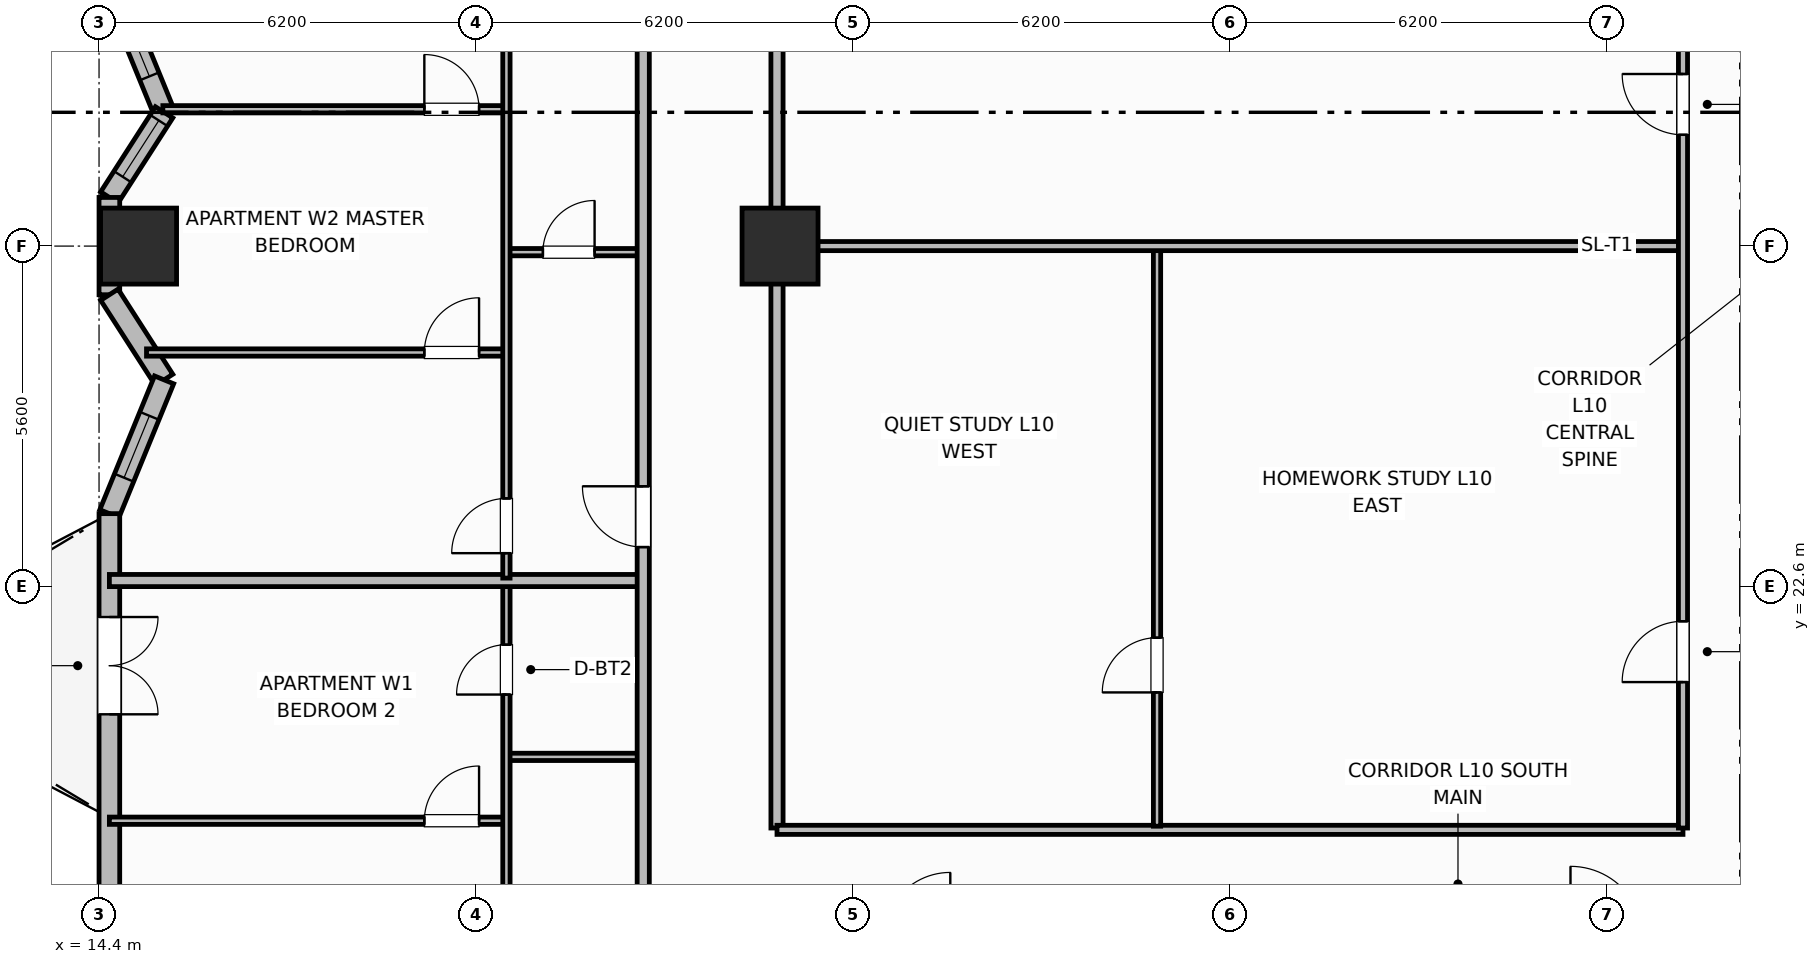
"""IFC4 building model, lengths in metres.
Left out: names, types, materials, properties, quantities, classifications, styles, units other than length and angle.
Written with IfcOpenShell. Run it as: python <this file> out.ifc"""

import sys

from ifc_helpers import new_model, si_unit, direction, frame, frame_2d, origin, origin_2d, place, context, subcontext, project, spatial, rectangle, extrude, element, fill, save


model = new_model("IFC4")
c1 = context("Model", 3, precision=1e-05, world=origin(), true_north=direction((0.0, 1.0)))
c2 = subcontext(c1, "Body", "Model", "MODEL_VIEW")
j1 = project(units=[si_unit("LENGTHUNIT", "METRE"), si_unit("PLANEANGLEUNIT", "RADIAN")], contexts=[c1])
p1 = place(None, origin())
s1 = spatial("IfcSite", under=j1, at=p1, CompositionType="ELEMENT")
p2 = place(p1, origin())
s2 = spatial("IfcBuilding", under=s1, at=p2, CompositionType="ELEMENT")
p3 = place(p2, frame((0.0, 0.0, 43.6)))
s3 = spatial("IfcBuildingStorey", under=s2, at=p3, CompositionType="ELEMENT", Elevation=43.6)
for number, where, z_axis, x_axis in (
    (1, (25.6, 28.2, 0.0), (0.0, 0.0, 1.0), (1.0, 0.0, 0.0)),
    (2, (15.05, 28.2, 0.0), (0.0, 0.0, 1.0), (1.0, 0.0, 0.0)),
):
    element("IfcColumn", number, at=place(p3, frame(where, z_axis=z_axis, x_axis=x_axis)), inside=s3, PredefinedType="COLUMN", context=c2, shape_type="SweptSolid", body=[
        extrude(rectangle(XDim=1.25, YDim=1.25, at=origin_2d()), origin(), (0.0, 0.0, 1.0), 3.7),
    ])
p4 = place(p3, frame((14.57, 32.6, 0.0), z_axis=(0.0, 0.0, 1.0), x_axis=(0.378568858991, -0.925573130013, 0.0)))
e3 = element("IfcWall", 3, at=p4, inside=s3, PredefinedType="SOLIDWALL", context=c2, shape_type="SweptSolid", body=[
    extrude(rectangle(XDim=2.377, YDim=0.34, at=frame_2d((1.188, 0.0))), origin(), (0.0, 0.0, 1.0), 2.7),
])
p5 = place(p4, frame((0.638, 0.0, 0.89)))
e4 = element("IfcOpeningElement", 4, at=p5, cuts=e3, PredefinedType="OPENING", context=c2, shape_type="SweptSolid", body=[
    extrude(rectangle(XDim=1.1, YDim=1.65, at=frame_2d((0.55, 0.825))), frame((0.0, 0.18, 0.0), z_axis=(0.0, -1.0, 0.0), x_axis=(1.0, 0.0, 0.0)), (0.0, 0.0, 1.0), 0.36),
])
p6 = place(p3, frame((15.47, 30.4, 0.0), z_axis=(0.0, 0.0, 1.0), x_axis=(-0.540742762169, -0.841188008214, 0.0)))
e5 = element("IfcWall", 5, at=p6, inside=s3, PredefinedType="SOLIDWALL", context=c2, shape_type="SweptSolid", body=[
    extrude(rectangle(XDim=1.664, YDim=0.34, at=frame_2d((0.832, 0.0))), origin(), (0.0, 0.0, 1.0), 2.7),
])
p7 = place(p6, frame((0.16, 0.0, 0.89)))
e6 = element("IfcOpeningElement", 6, at=p7, cuts=e5, PredefinedType="OPENING", context=c2, shape_type="SweptSolid", body=[
    extrude(rectangle(XDim=1.1, YDim=1.65, at=frame_2d((0.55, 0.825))), frame((0.0, 0.18, 0.0), z_axis=(0.0, -1.0, 0.0), x_axis=(1.0, 0.0, 0.0)), (0.0, 0.0, 1.0), 0.36),
])
p8 = place(p3, frame((14.57, 29.0, 0.0), z_axis=(0.0, 0.0, 1.0), x_axis=(0.0, -1.0, 0.0)))
e7 = element("IfcWall", 7, at=p8, inside=s3, PredefinedType="SOLIDWALL", context=c2, shape_type="SweptSolid", body=[
    extrude(rectangle(XDim=1.6, YDim=0.34, at=frame_2d((0.8, 0.0))), origin(), (0.0, 0.0, 1.0), 2.7),
])
p9 = place(p3, frame((14.57, 27.4, 0.0), z_axis=(0.0, 0.0, 1.0), x_axis=(0.540742762169, -0.841188008214, 0.0)))
e8 = element("IfcWall", 8, at=p9, inside=s3, PredefinedType="SOLIDWALL", context=c2, shape_type="SweptSolid", body=[
    extrude(rectangle(XDim=1.664, YDim=0.34, at=frame_2d((0.832, 0.0))), origin(), (0.0, 0.0, 1.0), 2.7),
])
p10 = place(p3, frame((15.47, 26.0, 0.0), z_axis=(0.0, 0.0, 1.0), x_axis=(-0.378604849088, -0.925558408879, 0.0)))
e9 = element("IfcWall", 9, at=p10, inside=s3, PredefinedType="SOLIDWALL", context=c2, shape_type="SweptSolid", body=[
    extrude(rectangle(XDim=2.377, YDim=0.34, at=frame_2d((1.188, 0.0))), origin(), (0.0, 0.0, 1.0), 2.7),
])
p11 = place(p10, frame((0.638, 0.0, 0.89)))
e10 = element("IfcOpeningElement", 10, at=p11, cuts=e9, PredefinedType="OPENING", context=c2, shape_type="SweptSolid", body=[
    extrude(rectangle(XDim=1.1, YDim=1.65, at=frame_2d((0.55, 0.825))), frame((0.0, 0.18, 0.0), z_axis=(0.0, -1.0, 0.0), x_axis=(1.0, 0.0, 0.0)), (0.0, 0.0, 1.0), 0.36),
])
p12 = place(p3, frame((14.57, 23.8, 0.0), z_axis=(0.0, 0.0, 1.0), x_axis=(0.0, -1.0, 0.0)))
e11 = element("IfcWall", 11, at=p12, inside=s3, PredefinedType="SOLIDWALL", context=c2, shape_type="SweptSolid", body=[
    extrude(rectangle(XDim=14.8, YDim=0.34, at=frame_2d((7.4, 0.0))), origin(), (0.0, 0.0, 1.0), 2.7),
])
p13 = place(p12, frame((1.7, 0.0, 0.0)))
e12 = element("IfcOpeningElement", 12, at=p13, cuts=e11, PredefinedType="OPENING", context=c2, shape_type="SweptSolid", body=[
    extrude(rectangle(XDim=1.6, YDim=2.1, at=frame_2d((0.8, 1.05))), frame((0.0, 0.18, 0.0), z_axis=(0.0, -1.0, 0.0), x_axis=(1.0, 0.0, 0.0)), (0.0, 0.0, 1.0), 0.36),
])
p14 = place(p12, frame((7.68, 0.0, 0.89)))
e13 = element("IfcOpeningElement", 13, at=p14, cuts=e11, PredefinedType="OPENING", context=c2, shape_type="SweptSolid", body=[
    extrude(rectangle(XDim=1.1, YDim=1.65, at=frame_2d((0.55, 0.825))), frame((0.0, 0.18, 0.0), z_axis=(0.0, -1.0, 0.0), x_axis=(1.0, 0.0, 0.0)), (0.0, 0.0, 1.0), 0.36),
])
p15 = place(p12, frame((9.95, 0.0, 0.73)))
e14 = element("IfcOpeningElement", 14, at=p15, cuts=e11, PredefinedType="OPENING", context=c2, shape_type="SweptSolid", body=[
    extrude(rectangle(XDim=1.8, YDim=1.85, at=frame_2d((0.9, 0.925))), frame((0.0, 0.18, 0.0), z_axis=(0.0, -1.0, 0.0), x_axis=(1.0, 0.0, 0.0)), (0.0, 0.0, 1.0), 0.36),
])
p16 = place(p3, frame((25.55, 18.63, 0.0), z_axis=(0.0, 0.0, 1.0), x_axis=(0.0, 1.0, 0.0)))
e15 = element("IfcWall", 15, at=p16, inside=s3, PredefinedType="PARTITIONING", context=c2, shape_type="SweptSolid", body=[
    extrude(rectangle(XDim=19.14, YDim=0.2, at=frame_2d((9.57, 0.0))), origin(), (0.0, 0.0, 1.0), 2.53),
])
p17 = place(p3, frame((25.55, 18.6, 0.0), z_axis=(0.0, 0.0, 1.0), x_axis=(1.0, 0.0, 0.0)))
e16 = element("IfcWall", 16, at=p17, inside=s3, PredefinedType="PARTITIONING", context=c2, shape_type="SweptSolid", body=[
    extrude(rectangle(XDim=14.9, YDim=0.15, at=frame_2d((7.45, 0.0))), origin(), (0.0, 0.0, 1.0), 2.53),
])
p18 = place(p3, frame((31.8, 18.66, 0.0), z_axis=(0.0, 0.0, 1.0), x_axis=(0.0, 1.0, 0.0)))
e17 = element("IfcWall", 17, at=p18, inside=s3, PredefinedType="PARTITIONING", context=c2, shape_type="SweptSolid", body=[
    extrude(rectangle(XDim=9.49, YDim=0.12, at=frame_2d((4.745, 0.0))), origin(), (0.0, 0.0, 1.0), 2.53),
])
p19 = place(p18, frame((2.2, 0.0, 0.0)))
e18 = element("IfcOpeningElement", 18, at=p19, cuts=e17, PredefinedType="OPENING", context=c2, shape_type="SweptSolid", body=[
    extrude(rectangle(XDim=0.9, YDim=2.1, at=frame_2d((0.45, 1.05))), frame((0.0, 0.07, 0.0), z_axis=(0.0, -1.0, 0.0), x_axis=(1.0, 0.0, 0.0)), (0.0, 0.0, 1.0), 0.14),
])
p20 = place(p3, frame((25.6, 28.2, 0.0), z_axis=(0.0, 0.0, 1.0), x_axis=(1.0, 0.0, 0.0)))
e19 = element("IfcWall", 19, at=p20, inside=s3, PredefinedType="PARTITIONING", context=c2, shape_type="SweptSolid", body=[
    extrude(rectangle(XDim=14.87, YDim=0.15, at=frame_2d((7.435, 0.0))), origin(), (0.0, 0.0, 1.0), 2.53),
])
p21 = place(p3, frame((40.45, 18.63, 0.0), z_axis=(0.0, 0.0, 1.0), x_axis=(0.0, 1.0, 0.0)))
e20 = element("IfcWall", 20, at=p21, inside=s3, PredefinedType="PARTITIONING", context=c2, shape_type="SweptSolid", body=[
    extrude(rectangle(XDim=19.14, YDim=0.15, at=frame_2d((9.57, 0.0))), origin(), (0.0, 0.0, 1.0), 2.53),
])
p22 = place(p21, frame((2.4, 0.0, 0.0)))
e21 = element("IfcOpeningElement", 21, at=p22, cuts=e20, PredefinedType="OPENING", context=c2, shape_type="SweptSolid", body=[
    extrude(rectangle(XDim=1.0, YDim=2.15, at=frame_2d((0.5, 1.075))), frame((0.0, 0.085, 0.0), z_axis=(0.0, -1.0, 0.0), x_axis=(1.0, 0.0, 0.0)), (0.0, 0.0, 1.0), 0.17),
])
p23 = place(p21, frame((11.4, 0.0, 0.0)))
e22 = element("IfcOpeningElement", 22, at=p23, cuts=e20, PredefinedType="OPENING", context=c2, shape_type="SweptSolid", body=[
    extrude(rectangle(XDim=1.0, YDim=2.15, at=frame_2d((0.5, 1.075))), frame((0.0, 0.085, 0.0), z_axis=(0.0, -1.0, 0.0), x_axis=(1.0, 0.0, 0.0)), (0.0, 0.0, 1.0), 0.17),
])
p24 = place(p3, frame((21.1, 19.8, 0.0), z_axis=(0.0, 0.0, 1.0), x_axis=(1.0, 0.0, 0.0)))
e23 = element("IfcWall", 23, at=p24, inside=s3, PredefinedType="PARTITIONING", context=c2, shape_type="SweptSolid", body=[
    extrude(rectangle(XDim=2.25, YDim=0.12, at=frame_2d((1.125, 0.0))), origin(), (0.0, 0.0, 1.0), 2.53),
])
p25 = place(p3, frame((14.57, 18.75, 0.0), z_axis=(0.0, 0.0, 1.0), x_axis=(1.0, 0.0, 0.0)))
e24 = element("IfcWall", 24, at=p25, inside=s3, PredefinedType="PARTITIONING", context=c2, shape_type="SweptSolid", body=[
    extrude(rectangle(XDim=6.53, YDim=0.12, at=frame_2d((3.265, 0.0))), origin(), (0.0, 0.0, 1.0), 2.53),
])
p26 = place(p25, frame((5.18, 0.0, 0.0)))
e25 = element("IfcOpeningElement", 25, at=p26, cuts=e24, PredefinedType="OPENING", context=c2, shape_type="SweptSolid", body=[
    extrude(rectangle(XDim=0.9, YDim=2.1, at=frame_2d((0.45, 1.05))), frame((0.0, 0.07, 0.0), z_axis=(0.0, -1.0, 0.0), x_axis=(1.0, 0.0, 0.0)), (0.0, 0.0, 1.0), 0.14),
])
p27 = place(p3, frame((21.1, 10.64, 0.0), z_axis=(0.0, 0.0, 1.0), x_axis=(0.0, 1.0, 0.0)))
e26 = element("IfcWall", 26, at=p27, inside=s3, PredefinedType="PARTITIONING", context=c2, shape_type="SweptSolid", body=[
    extrude(rectangle(XDim=12.02, YDim=0.12, at=frame_2d((6.01, 0.0))), origin(), (0.0, 0.0, 1.0), 2.53),
])
p28 = place(p27, frame((0.41, 0.0, 0.0)))
e27 = element("IfcOpeningElement", 27, at=p28, cuts=e26, PredefinedType="OPENING", context=c2, shape_type="SweptSolid", body=[
    extrude(rectangle(XDim=0.9, YDim=2.1, at=frame_2d((0.45, 1.05))), frame((0.0, 0.07, 0.0), z_axis=(0.0, -1.0, 0.0), x_axis=(1.0, 0.0, 0.0)), (0.0, 0.0, 1.0), 0.14),
])
p29 = place(p27, frame((10.185, 0.0, 0.0)))
e28 = element("IfcOpeningElement", 28, at=p29, cuts=e26, PredefinedType="OPENING", context=c2, shape_type="SweptSolid", body=[
    extrude(rectangle(XDim=0.82, YDim=2.08, at=frame_2d((0.41, 1.04))), frame((0.0, 0.07, 0.0), z_axis=(0.0, -1.0, 0.0), x_axis=(1.0, 0.0, 0.0)), (0.0, 0.0, 1.0), 0.14),
])
p30 = place(p3, frame((14.57, 22.7, 0.0), z_axis=(0.0, 0.0, 1.0), x_axis=(1.0, 0.0, 0.0)))
e29 = element("IfcWall", 29, at=p30, inside=s3, PredefinedType="PARTITIONING", context=c2, shape_type="SweptSolid", body=[
    extrude(rectangle(XDim=8.78, YDim=0.2, at=frame_2d((4.39, 0.0))), origin(), (0.0, 0.0, 1.0), 2.53),
])
p31 = place(p3, frame((21.1, 28.1, 0.0), z_axis=(0.0, 0.0, 1.0), x_axis=(1.0, 0.0, 0.0)))
e30 = element("IfcWall", 30, at=p31, inside=s3, PredefinedType="PARTITIONING", context=c2, shape_type="SweptSolid", body=[
    extrude(rectangle(XDim=2.25, YDim=0.12, at=frame_2d((1.125, 0.0))), origin(), (0.0, 0.0, 1.0), 2.53),
])
p32 = place(p31, frame((0.6, 0.0, 0.0)))
e31 = element("IfcOpeningElement", 31, at=p32, cuts=e30, PredefinedType="OPENING", context=c2, shape_type="SweptSolid", body=[
    extrude(rectangle(XDim=0.85, YDim=2.1, at=frame_2d((0.425, 1.05))), frame((0.0, 0.07, 0.0), z_axis=(0.0, -1.0, 0.0), x_axis=(1.0, 0.0, 0.0)), (0.0, 0.0, 1.0), 0.14),
])
p33 = place(p3, frame((15.181, 26.45, 0.0), z_axis=(0.0, 0.0, 1.0), x_axis=(1.0, 0.0, 0.0)))
e32 = element("IfcWall", 32, at=p33, inside=s3, PredefinedType="PARTITIONING", context=c2, shape_type="SweptSolid", body=[
    extrude(rectangle(XDim=5.919, YDim=0.12, at=frame_2d((2.96, 0.0))), origin(), (0.0, 0.0, 1.0), 2.53),
])
p34 = place(p33, frame((4.569, 0.0, 0.0)))
e33 = element("IfcOpeningElement", 33, at=p34, cuts=e32, PredefinedType="OPENING", context=c2, shape_type="SweptSolid", body=[
    extrude(rectangle(XDim=0.9, YDim=2.1, at=frame_2d((0.45, 1.05))), frame((0.0, 0.07, 0.0), z_axis=(0.0, -1.0, 0.0), x_axis=(1.0, 0.0, 0.0)), (0.0, 0.0, 1.0), 0.14),
])
p35 = place(p3, frame((15.449, 30.45, 0.0), z_axis=(0.0, 0.0, 1.0), x_axis=(1.0, 0.0, 0.0)))
e34 = element("IfcWall", 34, at=p35, inside=s3, PredefinedType="PARTITIONING", context=c2, shape_type="SweptSolid", body=[
    extrude(rectangle(XDim=5.651, YDim=0.12, at=frame_2d((2.825, 0.0))), origin(), (0.0, 0.0, 1.0), 2.53),
])
p36 = place(p35, frame((4.301, 0.0, 0.0)))
e35 = element("IfcOpeningElement", 35, at=p36, cuts=e34, PredefinedType="OPENING", context=c2, shape_type="SweptSolid", body=[
    extrude(rectangle(XDim=0.9, YDim=2.1, at=frame_2d((0.45, 1.05))), frame((0.0, 0.07, 0.0), z_axis=(0.0, -1.0, 0.0), x_axis=(1.0, 0.0, 0.0)), (0.0, 0.0, 1.0), 0.14),
])
p37 = place(p3, frame((21.1, 22.74, 0.0), z_axis=(0.0, 0.0, 1.0), x_axis=(0.0, 1.0, 0.0)))
e36 = element("IfcWall", 36, at=p37, inside=s3, PredefinedType="PARTITIONING", context=c2, shape_type="SweptSolid", body=[
    extrude(rectangle(XDim=11.404, YDim=0.12, at=frame_2d((5.702, 0.0))), origin(), (0.0, 0.0, 1.0), 2.53),
])
p38 = place(p37, frame((0.41, 0.0, 0.0)))
e37 = element("IfcOpeningElement", 37, at=p38, cuts=e36, PredefinedType="OPENING", context=c2, shape_type="SweptSolid", body=[
    extrude(rectangle(XDim=0.9, YDim=2.1, at=frame_2d((0.45, 1.05))), frame((0.0, 0.07, 0.0), z_axis=(0.0, -1.0, 0.0), x_axis=(1.0, 0.0, 0.0)), (0.0, 0.0, 1.0), 0.14),
])
p39 = place(p3, frame((23.35, 10.6, 0.0), z_axis=(0.0, 0.0, 1.0), x_axis=(0.0, 1.0, 0.0)))
e38 = element("IfcWall", 38, at=p39, inside=s3, PredefinedType="PARTITIONING", context=c2, shape_type="SweptSolid", body=[
    extrude(rectangle(XDim=35.2, YDim=0.2, at=frame_2d((17.6, 0.0))), origin(), (0.0, 0.0, 1.0), 2.53),
])
p40 = place(p39, frame((2.65, 0.0, 0.0)))
e39 = element("IfcOpeningElement", 39, at=p40, cuts=e38, PredefinedType="OPENING", context=c2, shape_type="SweptSolid", body=[
    extrude(rectangle(XDim=1.0, YDim=2.15, at=frame_2d((0.5, 1.075))), frame((0.0, 0.11, 0.0), z_axis=(0.0, -1.0, 0.0), x_axis=(1.0, 0.0, 0.0)), (0.0, 0.0, 1.0), 0.22),
])
p41 = place(p39, frame((12.65, 0.0, 0.0)))
e40 = element("IfcOpeningElement", 40, at=p41, cuts=e38, PredefinedType="OPENING", context=c2, shape_type="SweptSolid", body=[
    extrude(rectangle(XDim=1.0, YDim=2.15, at=frame_2d((0.5, 1.075))), frame((0.0, 0.11, 0.0), z_axis=(0.0, -1.0, 0.0), x_axis=(1.0, 0.0, 0.0)), (0.0, 0.0, 1.0), 0.22),
])
p42 = place(p39, frame((24.134, 0.0, 0.0)))
e41 = element("IfcOpeningElement", 41, at=p42, cuts=e38, PredefinedType="OPENING", context=c2, shape_type="SweptSolid", body=[
    extrude(rectangle(XDim=1.0, YDim=2.15, at=frame_2d((0.5, 1.075))), frame((0.0, 0.11, 0.0), z_axis=(0.0, -1.0, 0.0), x_axis=(1.0, 0.0, 0.0)), (0.0, 0.0, 1.0), 0.22),
])
p43 = place(p5, origin())
e42 = element("IfcWindow", 42, at=p43, inside=s3, PartitioningType="SINGLE_PANEL", PredefinedType="WINDOW", context=c2, shape_type="SweptSolid", body=[
    extrude(rectangle(XDim=1.1, YDim=1.65, at=frame_2d((0.55, 0.825))), frame((0.0, 0.03, 0.0), z_axis=(0.0, -1.0, 0.0), x_axis=(1.0, 0.0, 0.0)), (0.0, 0.0, 1.0), 0.06),
])
fill(e4, e42)
p44 = place(p7, origin())
e43 = element("IfcWindow", 43, at=p44, inside=s3, PartitioningType="SINGLE_PANEL", PredefinedType="WINDOW", context=c2, shape_type="SweptSolid", body=[
    extrude(rectangle(XDim=1.1, YDim=1.65, at=frame_2d((0.55, 0.825))), frame((0.0, 0.03, 0.0), z_axis=(0.0, -1.0, 0.0), x_axis=(1.0, 0.0, 0.0)), (0.0, 0.0, 1.0), 0.06),
])
fill(e6, e43)
p45 = place(p11, origin())
e44 = element("IfcWindow", 44, at=p45, inside=s3, PartitioningType="SINGLE_PANEL", PredefinedType="WINDOW", context=c2, shape_type="SweptSolid", body=[
    extrude(rectangle(XDim=1.1, YDim=1.65, at=frame_2d((0.55, 0.825))), frame((0.0, 0.03, 0.0), z_axis=(0.0, -1.0, 0.0), x_axis=(1.0, 0.0, 0.0)), (0.0, 0.0, 1.0), 0.06),
])
fill(e10, e44)
p46 = place(p13, origin())
e45 = element("IfcDoor", 45, at=p46, inside=s3, OperationType="DOUBLE_DOOR_SINGLE_SWING", PredefinedType="DOOR", context=c2, shape_type="SweptSolid", body=[
    extrude(rectangle(XDim=1.6, YDim=2.1, at=frame_2d((0.8, 1.05))), frame((0.0, 0.025, 0.0), z_axis=(0.0, -1.0, 0.0), x_axis=(1.0, 0.0, 0.0)), (0.0, 0.0, 1.0), 0.05),
])
fill(e12, e45)
p47 = place(p19, origin())
e46 = element("IfcDoor", 46, at=p47, inside=s3, OperationType="SINGLE_SWING_LEFT", PredefinedType="DOOR", context=c2, shape_type="SweptSolid", body=[
    extrude(rectangle(XDim=0.9, YDim=2.1, at=frame_2d((0.45, 1.05))), frame((0.0, 0.025, 0.0), z_axis=(0.0, -1.0, 0.0), x_axis=(1.0, 0.0, 0.0)), (0.0, 0.0, 1.0), 0.05),
])
fill(e18, e46)
p48 = place(p22, origin())
e47 = element("IfcDoor", 47, at=p48, inside=s3, OperationType="SINGLE_SWING_LEFT", PredefinedType="DOOR", context=c2, shape_type="SweptSolid", body=[
    extrude(rectangle(XDim=1.0, YDim=2.15, at=frame_2d((0.5, 1.075))), frame((0.0, 0.025, 0.0), z_axis=(0.0, -1.0, 0.0), x_axis=(1.0, 0.0, 0.0)), (0.0, 0.0, 1.0), 0.05),
])
fill(e21, e47)
p49 = place(p23, origin())
e48 = element("IfcDoor", 48, at=p49, inside=s3, OperationType="SINGLE_SWING_RIGHT", PredefinedType="DOOR", context=c2, shape_type="SweptSolid", body=[
    extrude(rectangle(XDim=1.0, YDim=2.15, at=frame_2d((0.5, 1.075))), frame((0.0, 0.025, 0.0), z_axis=(0.0, -1.0, 0.0), x_axis=(1.0, 0.0, 0.0)), (0.0, 0.0, 1.0), 0.05),
])
fill(e22, e48)
p50 = place(p26, origin())
e49 = element("IfcDoor", 49, at=p50, inside=s3, OperationType="SINGLE_SWING_RIGHT", PredefinedType="DOOR", context=c2, shape_type="SweptSolid", body=[
    extrude(rectangle(XDim=0.9, YDim=2.1, at=frame_2d((0.45, 1.05))), frame((0.0, 0.025, 0.0), z_axis=(0.0, -1.0, 0.0), x_axis=(1.0, 0.0, 0.0)), (0.0, 0.0, 1.0), 0.05),
])
fill(e25, e49)
p51 = place(p29, origin())
e50 = element("IfcDoor", 50, at=p51, inside=s3, OperationType="SINGLE_SWING_LEFT", PredefinedType="DOOR", context=c2, shape_type="SweptSolid", body=[
    extrude(rectangle(XDim=0.82, YDim=2.08, at=frame_2d((0.41, 1.04))), frame((0.0, 0.025, 0.0), z_axis=(0.0, -1.0, 0.0), x_axis=(1.0, 0.0, 0.0)), (0.0, 0.0, 1.0), 0.05),
])
fill(e28, e50)
p52 = place(p32, origin())
e51 = element("IfcDoor", 51, at=p52, inside=s3, OperationType="SINGLE_SWING_RIGHT", PredefinedType="DOOR", context=c2, shape_type="SweptSolid", body=[
    extrude(rectangle(XDim=0.85, YDim=2.1, at=frame_2d((0.425, 1.05))), frame((0.0, 0.025, 0.0), z_axis=(0.0, -1.0, 0.0), x_axis=(1.0, 0.0, 0.0)), (0.0, 0.0, 1.0), 0.05),
])
fill(e31, e51)
p53 = place(p34, origin())
e52 = element("IfcDoor", 52, at=p53, inside=s3, OperationType="SINGLE_SWING_RIGHT", PredefinedType="DOOR", context=c2, shape_type="SweptSolid", body=[
    extrude(rectangle(XDim=0.9, YDim=2.1, at=frame_2d((0.45, 1.05))), frame((0.0, 0.025, 0.0), z_axis=(0.0, -1.0, 0.0), x_axis=(1.0, 0.0, 0.0)), (0.0, 0.0, 1.0), 0.05),
])
fill(e33, e52)
p54 = place(p36, origin())
e53 = element("IfcDoor", 53, at=p54, inside=s3, OperationType="SINGLE_SWING_LEFT", PredefinedType="DOOR", context=c2, shape_type="SweptSolid", body=[
    extrude(rectangle(XDim=0.9, YDim=2.1, at=frame_2d((0.45, 1.05))), frame((0.0, 0.025, 0.0), z_axis=(0.0, -1.0, 0.0), x_axis=(1.0, 0.0, 0.0)), (0.0, 0.0, 1.0), 0.05),
])
fill(e35, e53)
p55 = place(p38, origin())
e54 = element("IfcDoor", 54, at=p55, inside=s3, OperationType="SINGLE_SWING_LEFT", PredefinedType="DOOR", context=c2, shape_type="SweptSolid", body=[
    extrude(rectangle(XDim=0.9, YDim=2.1, at=frame_2d((0.45, 1.05))), frame((0.0, 0.025, 0.0), z_axis=(0.0, -1.0, 0.0), x_axis=(1.0, 0.0, 0.0)), (0.0, 0.0, 1.0), 0.05),
])
fill(e37, e54)
p56 = place(p41, origin())
e55 = element("IfcDoor", 55, at=p56, inside=s3, OperationType="SINGLE_SWING_RIGHT", PredefinedType="DOOR", context=c2, shape_type="SweptSolid", body=[
    extrude(rectangle(XDim=1.0, YDim=2.15, at=frame_2d((0.5, 1.075))), frame((0.0, 0.025, 0.0), z_axis=(0.0, -1.0, 0.0), x_axis=(1.0, 0.0, 0.0)), (0.0, 0.0, 1.0), 0.05),
])
fill(e40, e55)
save(model, sys.argv[1])
